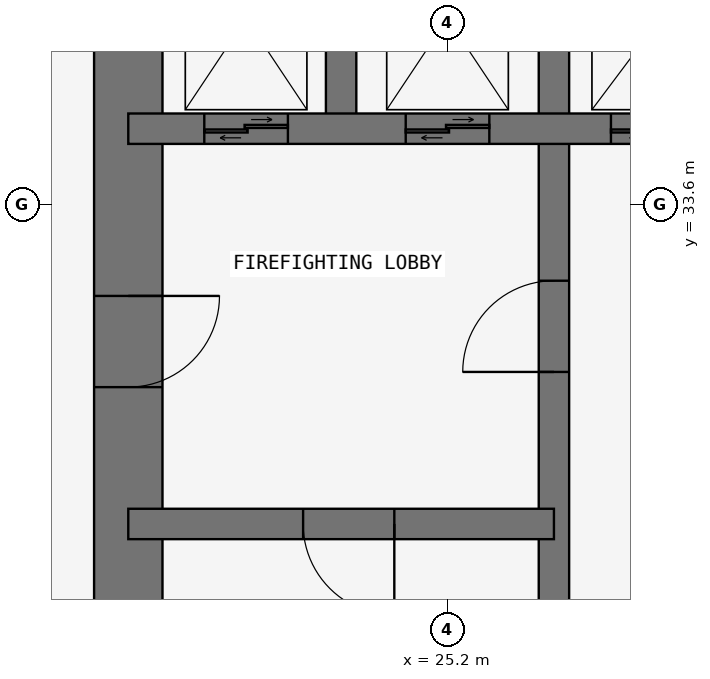
"""IFC4 building model, lengths in metres.
Left out: names, types, materials, properties, quantities, classifications, styles, units other than length and angle.
Written with IfcOpenShell. Run it as: python <this file> out.ifc"""

import sys

from ifc_helpers import new_model, si_unit, direction, frame, frame_2d, origin, place, context, subcontext, project, spatial, rectangle, extrude, element, fill, save


model = new_model("IFC4")
c1 = context("Model", 3, precision=1e-05, world=origin(), true_north=direction((0.0, 1.0)))
c2 = subcontext(c1, "Body", "Model", "MODEL_VIEW")
j1 = project(units=[si_unit("LENGTHUNIT", "METRE"), si_unit("PLANEANGLEUNIT", "RADIAN")], contexts=[c1])
p1 = place(None, origin())
s1 = spatial("IfcSite", under=j1, at=p1, CompositionType="ELEMENT")
p2 = place(p1, origin())
s2 = spatial("IfcBuilding", under=s1, at=p2, CompositionType="ELEMENT")
p3 = place(p2, frame((0.0, 0.0, 141.3)))
s3 = spatial("IfcBuildingStorey", under=s2, at=p3, CompositionType="ELEMENT", Elevation=141.3)
p4 = place(p3, frame((21.0, 37.8, 0.0), z_axis=(0.0, 0.0, 1.0), x_axis=(0.0, -1.0, 0.0)))
e1 = element("IfcWall", 1, at=p4, inside=s3, PredefinedType="SHEAR", context=c2, shape_type="SweptSolid", body=[
    extrude(rectangle(XDim=17.25, YDim=0.9, at=frame_2d((8.625, 0.0))), origin(), (0.0, 0.0, 1.0), 3.6),
])
p5 = place(p4, frame((5.4, 0.0, 0.0)))
e2 = element("IfcOpeningElement", 2, at=p5, cuts=e1, PredefinedType="OPENING", context=c2, shape_type="SweptSolid", body=[
    extrude(rectangle(XDim=1.2, YDim=2.1, at=frame_2d((0.6, 1.05))), frame((0.0, 0.46, 0.0), z_axis=(0.0, -1.0, 0.0), x_axis=(1.0, 0.0, 0.0)), (0.0, 0.0, 1.0), 0.92),
])
p6 = place(p3, frame((26.6, 21.0, 0.0), z_axis=(0.0, 0.0, 1.0), x_axis=(0.0, 1.0, 0.0)))
e3 = element("IfcWall", 3, at=p6, inside=s3, PredefinedType="SHEAR", context=c2, shape_type="SweptSolid", body=[
    extrude(rectangle(XDim=16.8, YDim=0.4, at=frame_2d((8.4, 0.0))), origin(), (0.0, 0.0, 1.0), 3.6),
])
p7 = place(p6, frame((10.4, 0.0, 0.0)))
e4 = element("IfcOpeningElement", 4, at=p7, cuts=e3, PredefinedType="OPENING", context=c2, shape_type="SweptSolid", body=[
    extrude(rectangle(XDim=1.2, YDim=2.1, at=frame_2d((0.6, 1.05))), frame((0.0, 0.21, 0.0), z_axis=(0.0, -1.0, 0.0), x_axis=(1.0, 0.0, 0.0)), (0.0, 0.0, 1.0), 0.42),
])
p8 = place(p3, frame((21.0, 29.4, 0.0), z_axis=(0.0, 0.0, 1.0), x_axis=(1.0, 0.0, 0.0)))
e5 = element("IfcWall", 5, at=p8, inside=s3, PredefinedType="SHEAR", context=c2, shape_type="SweptSolid", body=[
    extrude(rectangle(XDim=5.6, YDim=0.4, at=frame_2d((2.8, 0.0))), origin(), (0.0, 0.0, 1.0), 3.6),
])
p9 = place(p8, frame((2.3, 0.0, 0.0)))
e6 = element("IfcOpeningElement", 6, at=p9, cuts=e5, PredefinedType="OPENING", context=c2, shape_type="SweptSolid", body=[
    extrude(rectangle(XDim=1.2, YDim=2.1, at=frame_2d((0.6, 1.05))), frame((0.0, 0.21, 0.0), z_axis=(0.0, -1.0, 0.0), x_axis=(1.0, 0.0, 0.0)), (0.0, 0.0, 1.0), 0.42),
])
p10 = place(p3, frame((21.0, 34.6, 0.0), z_axis=(0.0, 0.0, 1.0), x_axis=(1.0, 0.0, 0.0)))
e7 = element("IfcWall", 7, at=p10, inside=s3, PredefinedType="SHEAR", context=c2, shape_type="SweptSolid", body=[
    extrude(rectangle(XDim=11.2, YDim=0.4, at=frame_2d((5.6, 0.0))), origin(), (0.0, 0.0, 1.0), 3.6),
])
p11 = place(p10, frame((9.35, 0.0, 0.0)))
e8 = element("IfcOpeningElement", 8, at=p11, cuts=e7, PredefinedType="OPENING", context=c2, shape_type="SweptSolid", body=[
    extrude(rectangle(XDim=0.9, YDim=2.1, at=frame_2d((0.45, 1.05))), frame((0.0, 0.21, 0.0), z_axis=(0.0, -1.0, 0.0), x_axis=(1.0, 0.0, 0.0)), (0.0, 0.0, 1.0), 0.42),
])
p12 = place(p10, frame((1.0, 0.0, 0.0)))
e9 = element("IfcOpeningElement", 9, at=p12, cuts=e7, PredefinedType="OPENING", context=c2, shape_type="SweptSolid", body=[
    extrude(rectangle(XDim=1.1, YDim=2.1, at=frame_2d((0.55, 1.05))), frame((0.0, 0.21, 0.0), z_axis=(0.0, -1.0, 0.0), x_axis=(1.0, 0.0, 0.0)), (0.0, 0.0, 1.0), 0.42),
])
p13 = place(p10, frame((3.65, 0.0, 0.0)))
e10 = element("IfcOpeningElement", 10, at=p13, cuts=e7, PredefinedType="OPENING", context=c2, shape_type="SweptSolid", body=[
    extrude(rectangle(XDim=1.1, YDim=2.1, at=frame_2d((0.55, 1.05))), frame((0.0, 0.21, 0.0), z_axis=(0.0, -1.0, 0.0), x_axis=(1.0, 0.0, 0.0)), (0.0, 0.0, 1.0), 0.42),
])
p14 = place(p10, frame((6.35, 0.0, 0.0)))
e11 = element("IfcOpeningElement", 11, at=p14, cuts=e7, PredefinedType="OPENING", context=c2, shape_type="SweptSolid", body=[
    extrude(rectangle(XDim=1.3, YDim=2.1, at=frame_2d((0.65, 1.05))), frame((0.0, 0.21, 0.0), z_axis=(0.0, -1.0, 0.0), x_axis=(1.0, 0.0, 0.0)), (0.0, 0.0, 1.0), 0.42),
])
p15 = place(p3, frame((23.8, 34.6, 0.0), z_axis=(0.0, 0.0, 1.0), x_axis=(0.0, 1.0, 0.0)))
e12 = element("IfcWall", 12, at=p15, inside=s3, PredefinedType="SHEAR", context=c2, shape_type="SweptSolid", body=[
    extrude(rectangle(XDim=3.2, YDim=0.4, at=frame_2d((1.6, 0.0))), origin(), (0.0, 0.0, 1.0), 3.6),
])
p16 = place(p5, origin())
e13 = element("IfcDoor", 13, at=p16, inside=s3, OperationType="SINGLE_SWING_LEFT", PredefinedType="DOOR", context=c2, shape_type="SweptSolid", body=[
    extrude(rectangle(XDim=1.2, YDim=2.1, at=frame_2d((0.6, 1.05))), frame((0.0, 0.025, 0.0), z_axis=(0.0, -1.0, 0.0), x_axis=(1.0, 0.0, 0.0)), (0.0, 0.0, 1.0), 0.05),
])
fill(e2, e13)
p17 = place(p9, frame((1.2, 0.0, 0.0), z_axis=(0.0, 0.0, 1.0), x_axis=(-1.0, 0.0, 0.0)))
e14 = element("IfcDoor", 14, at=p17, inside=s3, OperationType="SINGLE_SWING_LEFT", PredefinedType="DOOR", context=c2, shape_type="SweptSolid", body=[
    extrude(rectangle(XDim=1.2, YDim=2.1, at=frame_2d((0.6, 1.05))), frame((0.0, 0.025, 0.0), z_axis=(0.0, -1.0, 0.0), x_axis=(1.0, 0.0, 0.0)), (0.0, 0.0, 1.0), 0.05),
])
fill(e6, e14)
p18 = place(p7, origin())
e15 = element("IfcDoor", 15, at=p18, inside=s3, OperationType="SINGLE_SWING_LEFT", PredefinedType="DOOR", context=c2, shape_type="SweptSolid", body=[
    extrude(rectangle(XDim=1.2, YDim=2.1, at=frame_2d((0.6, 1.05))), frame((0.0, 0.025, 0.0), z_axis=(0.0, -1.0, 0.0), x_axis=(1.0, 0.0, 0.0)), (0.0, 0.0, 1.0), 0.05),
])
fill(e4, e15)
p19 = place(p12, origin())
e16 = element("IfcDoor", 16, at=p19, inside=s3, OperationType="DOUBLE_DOOR_SLIDING", PredefinedType="DOOR", context=c2, shape_type="SweptSolid", body=[
    extrude(rectangle(XDim=1.1, YDim=2.1, at=frame_2d((0.55, 1.05))), frame((0.0, 0.025, 0.0), z_axis=(0.0, -1.0, 0.0), x_axis=(1.0, 0.0, 0.0)), (0.0, 0.0, 1.0), 0.05),
])
fill(e9, e16)
p20 = place(p13, origin())
e17 = element("IfcDoor", 17, at=p20, inside=s3, OperationType="DOUBLE_DOOR_SLIDING", PredefinedType="DOOR", context=c2, shape_type="SweptSolid", body=[
    extrude(rectangle(XDim=1.1, YDim=2.1, at=frame_2d((0.55, 1.05))), frame((0.0, 0.025, 0.0), z_axis=(0.0, -1.0, 0.0), x_axis=(1.0, 0.0, 0.0)), (0.0, 0.0, 1.0), 0.05),
])
fill(e10, e17)
p21 = place(p14, origin())
e18 = element("IfcDoor", 18, at=p21, inside=s3, OperationType="DOUBLE_DOOR_SLIDING", PredefinedType="DOOR", context=c2, shape_type="SweptSolid", body=[
    extrude(rectangle(XDim=1.3, YDim=2.1, at=frame_2d((0.65, 1.05))), frame((0.0, 0.025, 0.0), z_axis=(0.0, -1.0, 0.0), x_axis=(1.0, 0.0, 0.0)), (0.0, 0.0, 1.0), 0.05),
])
fill(e11, e18)
save(model, sys.argv[1])
